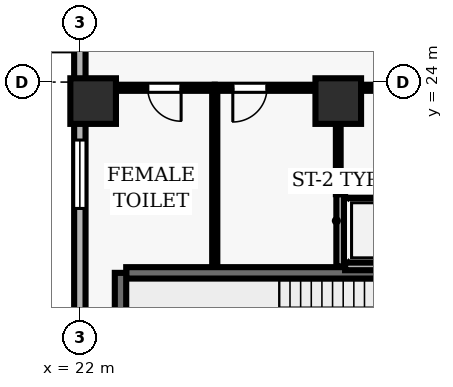
"""IFC4 building model, lengths in metres.
Left out: names, types, materials, properties, quantities, classifications, styles, units other than length and angle.
Written with IfcOpenShell. Run it as: python <this file> out.ifc"""

import sys

from ifc_helpers import new_model, si_unit, direction, frame, frame_2d, origin, origin_2d, place, context, subcontext, project, spatial, rectangle, extrude, element, fill, save


model = new_model("IFC4")
c1 = context("Model", 3, precision=1e-05, world=origin(), true_north=direction((0.0, 1.0)))
c2 = subcontext(c1, "Body", "Model", "MODEL_VIEW")
j1 = project(units=[si_unit("LENGTHUNIT", "METRE"), si_unit("PLANEANGLEUNIT", "RADIAN")], contexts=[c1])
p1 = place(None, origin())
s1 = spatial("IfcSite", under=j1, at=p1, CompositionType="ELEMENT")
p2 = place(p1, origin())
s2 = spatial("IfcBuilding", under=s1, at=p2, CompositionType="ELEMENT")
p3 = place(p2, frame((0.0, 0.0, 138.5)))
s3 = spatial("IfcBuildingStorey", under=s2, at=p3, CompositionType="ELEMENT", Elevation=138.5)
for number, where, z_axis, x_axis in (
    (1, (22.35, 23.5, 0.0), (0.0, 0.0, 1.0), (1.0, 0.0, 0.0)),
    (2, (28.8, 23.5, 0.0), (0.0, 0.0, 1.0), (1.0, 0.0, 0.0)),
):
    element("IfcColumn", number, at=place(p3, frame(where, z_axis=z_axis, x_axis=x_axis)), inside=s3, PredefinedType="COLUMN", context=c2, shape_type="SweptSolid", body=[
        extrude(rectangle(XDim=1.2, YDim=1.2, at=origin_2d()), origin(), (0.0, 0.0, 1.0), 3.9),
    ])
p4 = place(p3, frame((22.0, 46.1, 0.0), z_axis=(0.0, 0.0, 1.0), x_axis=(0.0, -1.0, 0.0)))
e3 = element("IfcWall", 3, at=p4, inside=s3, PredefinedType="SOLIDWALL", context=c2, shape_type="SweptSolid", body=[
    extrude(rectangle(XDim=43.6, YDim=0.3, at=frame_2d((21.8, 0.0))), origin(), (0.0, 0.0, 1.0), 3.69),
])
p5 = place(p4, frame((12.7, 0.0, 0.0)))
e4 = element("IfcOpeningElement", 4, at=p5, cuts=e3, PredefinedType="OPENING", context=c2, shape_type="SweptSolid", body=[
    extrude(rectangle(XDim=1.0, YDim=2.2, at=frame_2d((0.5, 1.1))), frame((0.0, 0.16, 0.0), z_axis=(0.0, -1.0, 0.0), x_axis=(1.0, 0.0, 0.0)), (0.0, 0.0, 1.0), 0.32),
])
p6 = place(p4, frame((1.825, 0.0, 0.9)))
e5 = element("IfcOpeningElement", 5, at=p6, cuts=e3, PredefinedType="OPENING", context=c2, shape_type="SweptSolid", body=[
    extrude(rectangle(XDim=1.8, YDim=2.2, at=frame_2d((0.9, 1.1))), frame((0.0, 0.16, 0.0), z_axis=(0.0, -1.0, 0.0), x_axis=(1.0, 0.0, 0.0)), (0.0, 0.0, 1.0), 0.32),
])
p7 = place(p4, frame((17.725, 0.0, 0.9)))
e6 = element("IfcOpeningElement", 6, at=p7, cuts=e3, PredefinedType="OPENING", context=c2, shape_type="SweptSolid", body=[
    extrude(rectangle(XDim=1.8, YDim=2.2, at=frame_2d((0.9, 1.1))), frame((0.0, 0.16, 0.0), z_axis=(0.0, -1.0, 0.0), x_axis=(1.0, 0.0, 0.0)), (0.0, 0.0, 1.0), 0.32),
])
p8 = place(p4, frame((23.625, 0.0, 0.9)))
e7 = element("IfcOpeningElement", 7, at=p8, cuts=e3, PredefinedType="OPENING", context=c2, shape_type="SweptSolid", body=[
    extrude(rectangle(XDim=1.8, YDim=2.2, at=frame_2d((0.9, 1.1))), frame((0.0, 0.16, 0.0), z_axis=(0.0, -1.0, 0.0), x_axis=(1.0, 0.0, 0.0)), (0.0, 0.0, 1.0), 0.32),
])
p9 = place(p4, frame((28.625, 0.0, 0.9)))
e8 = element("IfcOpeningElement", 8, at=p9, cuts=e3, PredefinedType="OPENING", context=c2, shape_type="SweptSolid", body=[
    extrude(rectangle(XDim=1.8, YDim=2.2, at=frame_2d((0.9, 1.1))), frame((0.0, 0.16, 0.0), z_axis=(0.0, -1.0, 0.0), x_axis=(1.0, 0.0, 0.0)), (0.0, 0.0, 1.0), 0.32),
])
p10 = place(p4, frame((34.525, 0.0, 0.9)))
e9 = element("IfcOpeningElement", 9, at=p10, cuts=e3, PredefinedType="OPENING", context=c2, shape_type="SweptSolid", body=[
    extrude(rectangle(XDim=1.8, YDim=2.2, at=frame_2d((0.9, 1.1))), frame((0.0, 0.16, 0.0), z_axis=(0.0, -1.0, 0.0), x_axis=(1.0, 0.0, 0.0)), (0.0, 0.0, 1.0), 0.32),
])
p11 = place(p3, frame((31.58, 18.98, 0.0), z_axis=(0.0, 0.0, 1.0), x_axis=(-1.0, 0.0, 0.0)))
e10 = element("IfcWall", 10, at=p11, inside=s3, PredefinedType="SHEAR", context=c2, shape_type="SweptSolid", body=[
    extrude(rectangle(XDim=8.36, YDim=0.3, at=frame_2d((4.18, 0.0))), origin(), (0.0, 0.0, 1.0), 3.69),
])
p12 = place(p3, frame((23.07, 18.98, 0.0), z_axis=(0.0, 0.0, 1.0), x_axis=(0.0, -1.0, 0.0)))
e11 = element("IfcWall", 11, at=p12, inside=s3, PredefinedType="SHEAR", context=c2, shape_type="SweptSolid", body=[
    extrude(rectangle(XDim=3.51, YDim=0.3, at=frame_2d((1.755, 0.0))), origin(), (0.0, 0.0, 1.0), 3.69),
])
p13 = place(p3, frame((28.85, 21.05, 0.0), z_axis=(0.0, 0.0, 1.0), x_axis=(0.0, -1.0, 0.0)))
e12 = element("IfcWall", 12, at=p13, inside=s3, PredefinedType="SOLIDWALL", context=c2, shape_type="SweptSolid", body=[
    extrude(rectangle(XDim=1.9, YDim=0.2, at=frame_2d((0.95, 0.0))), origin(), (0.0, 0.0, 1.0), 3.69),
])
for number, where, z_axis, x_axis in (
    (13, (28.98, 19.15, 0.0), (0.0, 0.0, 1.0), (1.0, 0.0, 0.0)),
    (14, (31.42, 21.05, 0.0), (0.0, 0.0, 1.0), (-1.0, 0.0, 0.0)),
):
    element("IfcWall", number, at=place(p3, frame(where, z_axis=z_axis, x_axis=x_axis)), inside=s3, PredefinedType="SOLIDWALL", context=c2, shape_type="SweptSolid", body=[
        extrude(rectangle(XDim=2.44, YDim=0.2, at=frame_2d((1.22, 0.0))), origin(), (0.0, 0.0, 1.0), 3.69),
    ])
p14 = place(p3, frame((25.55, 23.85, 0.0), z_axis=(0.0, 0.0, 1.0), x_axis=(-1.0, 0.0, 0.0)))
e15 = element("IfcWall", 15, at=p14, inside=s3, PredefinedType="PARTITIONING", context=c2, shape_type="SweptSolid", body=[
    extrude(rectangle(XDim=3.35, YDim=0.16, at=frame_2d((1.675, 0.0))), origin(), (0.0, 0.0, 1.0), 3.073),
])
p15 = place(p14, frame((0.885, 0.0, 0.0)))
e16 = element("IfcOpeningElement", 16, at=p15, cuts=e15, PredefinedType="OPENING", context=c2, shape_type="SweptSolid", body=[
    extrude(rectangle(XDim=0.88, YDim=2.1, at=frame_2d((0.44, 1.05))), frame((0.0, 0.09, 0.0), z_axis=(0.0, -1.0, 0.0), x_axis=(1.0, 0.0, 0.0)), (0.0, 0.0, 1.0), 0.18),
])
p16 = place(p3, frame((28.8, 23.85, 0.0), z_axis=(0.0, 0.0, 1.0), x_axis=(-1.0, 0.0, 0.0)))
e17 = element("IfcWall", 17, at=p16, inside=s3, PredefinedType="PARTITIONING", context=c2, shape_type="SweptSolid", body=[
    extrude(rectangle(XDim=3.25, YDim=0.16, at=frame_2d((1.625, 0.0))), origin(), (0.0, 0.0, 1.0), 3.073),
])
p17 = place(p16, frame((1.875, 0.0, 0.0)))
e18 = element("IfcOpeningElement", 18, at=p17, cuts=e17, PredefinedType="OPENING", context=c2, shape_type="SweptSolid", body=[
    extrude(rectangle(XDim=0.9, YDim=2.1, at=frame_2d((0.45, 1.05))), frame((0.0, 0.09, 0.0), z_axis=(0.0, -1.0, 0.0), x_axis=(1.0, 0.0, 0.0)), (0.0, 0.0, 1.0), 0.18),
])
p18 = place(p3, frame((31.65, 23.85, 0.0), z_axis=(0.0, 0.0, 1.0), x_axis=(-1.0, 0.0, 0.0)))
e19 = element("IfcWall", 19, at=p18, inside=s3, PredefinedType="PARTITIONING", context=c2, shape_type="SweptSolid", body=[
    extrude(rectangle(XDim=2.85, YDim=0.16, at=frame_2d((1.425, 0.0))), origin(), (0.0, 0.0, 1.0), 3.073),
])
p19 = place(p3, frame((25.55, 19.16, 0.0), z_axis=(0.0, 0.0, 1.0), x_axis=(0.0, 1.0, 0.0)))
e20 = element("IfcWall", 20, at=p19, inside=s3, PredefinedType="PARTITIONING", context=c2, shape_type="SweptSolid", body=[
    extrude(rectangle(XDim=4.615, YDim=0.135, at=frame_2d((2.308, 0.0))), origin(), (0.0, 0.0, 1.0), 3.69),
])
p20 = place(p3, frame((28.8, 23.775, 0.0), z_axis=(0.0, 0.0, 1.0), x_axis=(0.0, -1.0, 0.0)))
e21 = element("IfcWall", 21, at=p20, inside=s3, PredefinedType="PARTITIONING", context=c2, shape_type="SweptSolid", body=[
    extrude(rectangle(XDim=2.725, YDim=0.125, at=frame_2d((1.362, 0.0))), origin(), (0.0, 0.0, 1.0), 3.69),
])
p21 = place(p8, origin())
e22 = element("IfcWindow", 22, at=p21, inside=s3, PartitioningType="SINGLE_PANEL", PredefinedType="WINDOW", context=c2, shape_type="SweptSolid", body=[
    extrude(rectangle(XDim=1.8, YDim=2.2, at=frame_2d((0.9, 1.1))), frame((0.0, 0.03, 0.0), z_axis=(0.0, -1.0, 0.0), x_axis=(1.0, 0.0, 0.0)), (0.0, 0.0, 1.0), 0.06),
])
fill(e7, e22)
p22 = place(p15, origin())
e23 = element("IfcDoor", 23, at=p22, inside=s3, OperationType="SINGLE_SWING_LEFT", PredefinedType="DOOR", context=c2, shape_type="SweptSolid", body=[
    extrude(rectangle(XDim=0.88, YDim=2.1, at=frame_2d((0.44, 1.05))), frame((0.0, 0.025, 0.0), z_axis=(0.0, -1.0, 0.0), x_axis=(1.0, 0.0, 0.0)), (0.0, 0.0, 1.0), 0.05),
])
fill(e16, e23)
p23 = place(p17, origin())
e24 = element("IfcDoor", 24, at=p23, inside=s3, OperationType="SINGLE_SWING_RIGHT", PredefinedType="DOOR", context=c2, shape_type="SweptSolid", body=[
    extrude(rectangle(XDim=0.9, YDim=2.1, at=frame_2d((0.45, 1.05))), frame((0.0, 0.025, 0.0), z_axis=(0.0, -1.0, 0.0), x_axis=(1.0, 0.0, 0.0)), (0.0, 0.0, 1.0), 0.05),
])
fill(e18, e24)
save(model, sys.argv[1])
